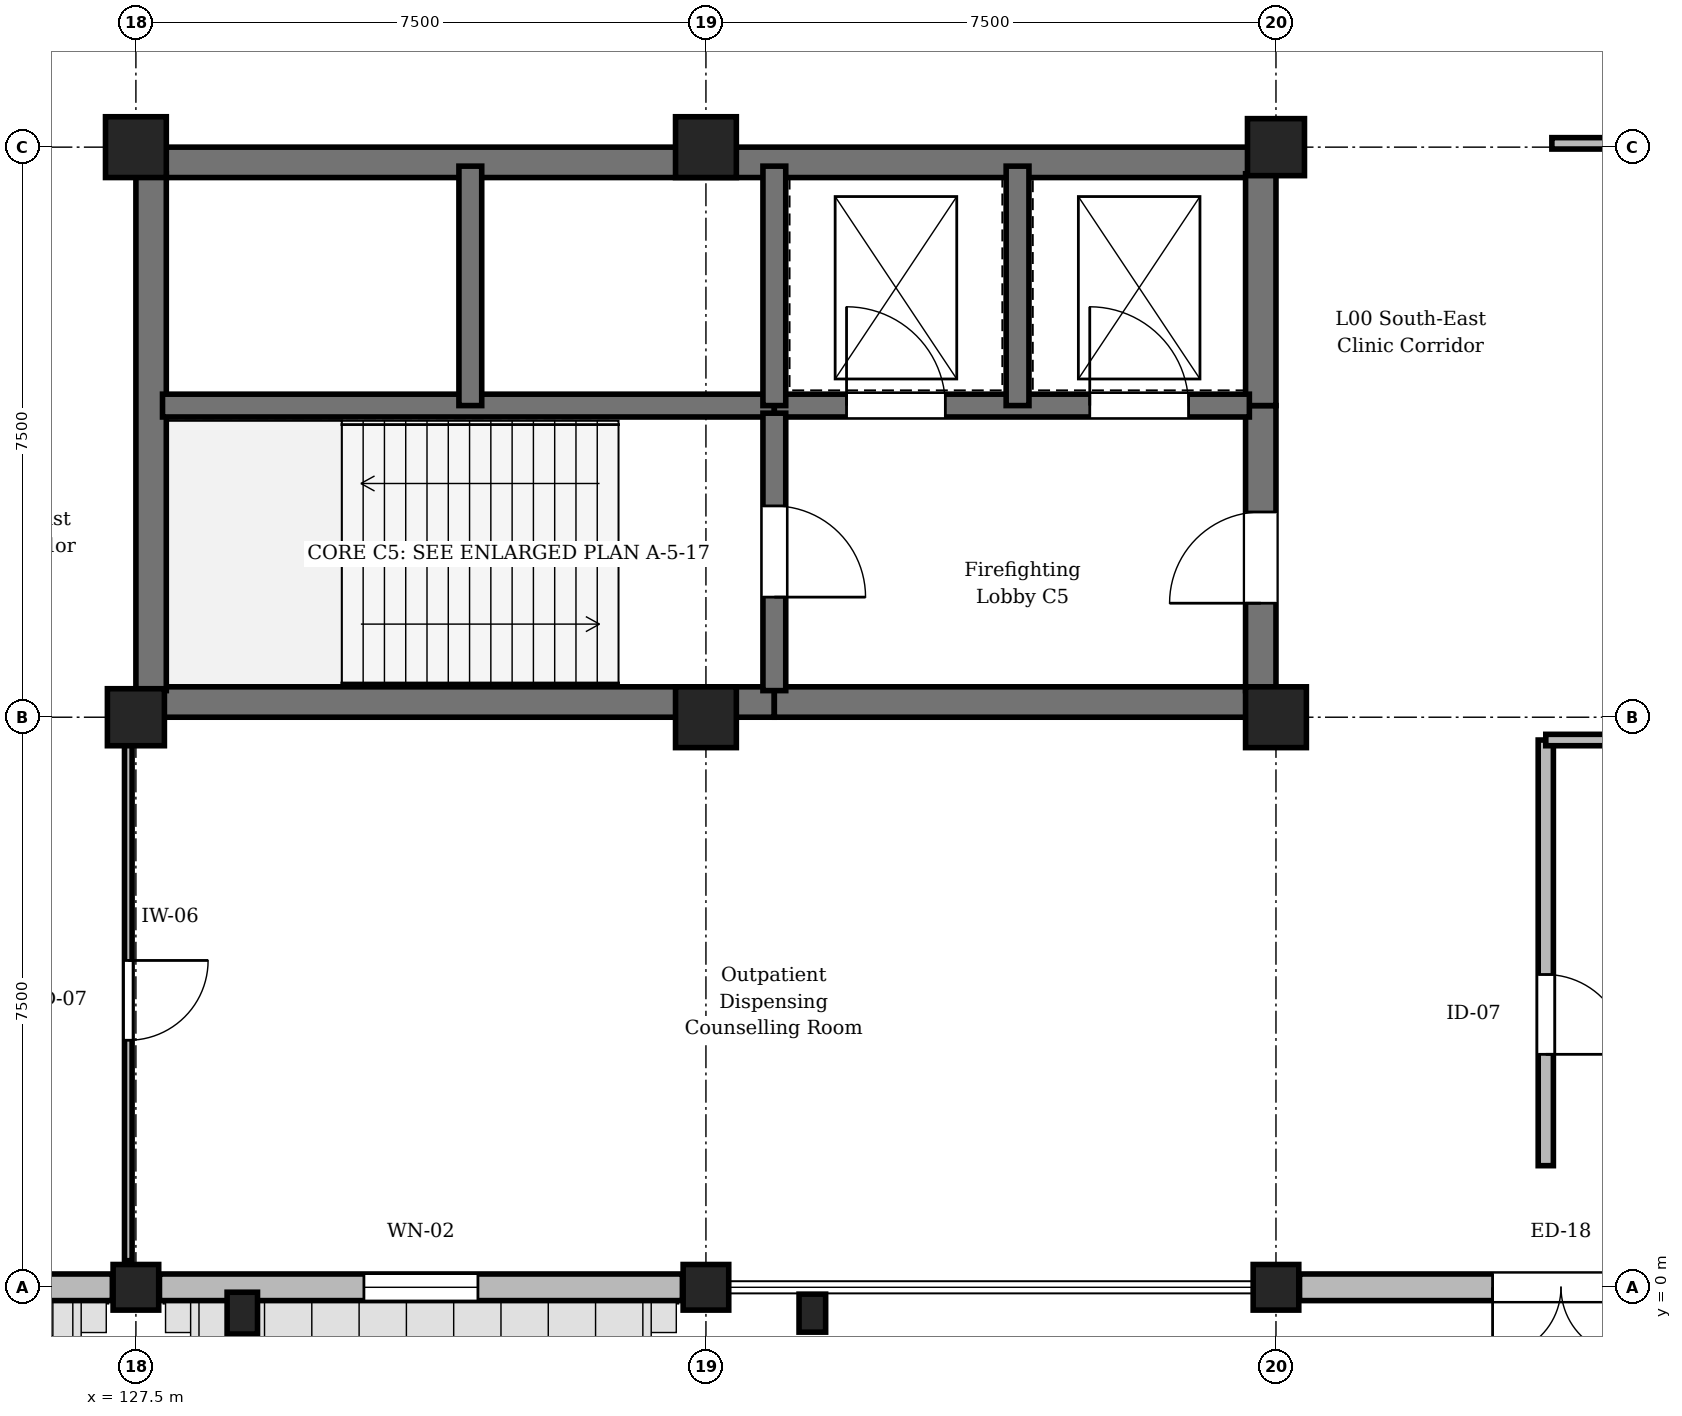
"""IFC4 building model, lengths in metres.
Left out: names, types, materials, properties, quantities, classifications, styles, units other than length and angle.
Written with IfcOpenShell. Run it as: python <this file> out.ifc"""

import sys

from ifc_helpers import new_model, si_unit, direction, frame, frame_2d, origin, origin_2d, place, context, subcontext, project, spatial, rectangle, circle, extrude, element, fill, save


model = new_model("IFC4")
c1 = context("Model", 3, precision=1e-05, world=origin(), true_north=direction((0.0, 1.0)))
c2 = subcontext(c1, "Body", "Model", "MODEL_VIEW")
j1 = project(units=[si_unit("LENGTHUNIT", "METRE"), si_unit("PLANEANGLEUNIT", "RADIAN")], contexts=[c1])
p1 = place(None, origin())
s1 = spatial("IfcSite", under=j1, at=p1, CompositionType="ELEMENT")
p2 = place(p1, origin())
s2 = spatial("IfcBuilding", under=s1, at=p2, CompositionType="ELEMENT")
p3 = place(p2, origin())
s3 = spatial("IfcBuildingStorey", under=s2, at=p3, CompositionType="ELEMENT", Elevation=0.0)
p4 = place(p3, frame((127.5, 0.0, 0.0), z_axis=(0.0, 0.0, 1.0), x_axis=(1.0, 0.0, 0.0)))
e1 = element("IfcColumn", 1, at=p4, inside=s3, PredefinedType="COLUMN", context=c2, shape_type="SweptSolid", body=[
    extrude(rectangle(XDim=0.6, YDim=0.6, at=origin_2d()), origin(), (0.0, 0.0, 1.0), 4.8),
])
p5 = place(p3, frame((127.5, 7.5, 0.0), z_axis=(0.0, 0.0, 1.0), x_axis=(1.0, 0.0, 0.0)))
e2 = element("IfcColumn", 2, at=p5, inside=s3, PredefinedType="COLUMN", context=c2, shape_type="SweptSolid", body=[
    extrude(circle(Radius=0.375, at=origin_2d()), origin(), (0.0, 0.0, 1.0), 4.8),
])
p6 = place(p3, frame((127.5, 15.0, 0.0), z_axis=(0.0, 0.0, 1.0), x_axis=(1.0, 0.0, 0.0)))
e3 = element("IfcColumn", 3, at=p6, inside=s3, PredefinedType="COLUMN", context=c2, shape_type="SweptSolid", body=[
    extrude(rectangle(XDim=0.8, YDim=0.8, at=origin_2d()), origin(), (0.0, 0.0, 1.0), 4.8),
])
p7 = place(p3, frame((135.0, 0.0, 0.0), z_axis=(0.0, 0.0, 1.0), x_axis=(1.0, 0.0, 0.0)))
e4 = element("IfcColumn", 4, at=p7, inside=s3, PredefinedType="COLUMN", context=c2, shape_type="SweptSolid", body=[
    extrude(circle(Radius=0.3, at=origin_2d()), origin(), (0.0, 0.0, 1.0), 4.8),
])
for number, where, z_axis, x_axis in (
    (5, (135.0, 7.5, 0.0), (0.0, 0.0, 1.0), (1.0, 0.0, 0.0)),
    (6, (135.0, 15.0, 0.0), (0.0, 0.0, 1.0), (1.0, 0.0, 0.0)),
):
    element("IfcColumn", number, at=place(p3, frame(where, z_axis=z_axis, x_axis=x_axis)), inside=s3, PredefinedType="COLUMN", context=c2, shape_type="SweptSolid", body=[
        extrude(rectangle(XDim=0.8, YDim=0.8, at=origin_2d()), origin(), (0.0, 0.0, 1.0), 4.8),
    ])
p8 = place(p3, frame((142.5, 0.0, 0.0), z_axis=(0.0, 0.0, 1.0), x_axis=(1.0, 0.0, 0.0)))
e7 = element("IfcColumn", 7, at=p8, inside=s3, PredefinedType="COLUMN", context=c2, shape_type="SweptSolid", body=[
    extrude(rectangle(XDim=0.6, YDim=0.6, at=origin_2d()), origin(), (0.0, 0.0, 1.0), 4.8),
])
p9 = place(p3, frame((142.5, 7.5, 0.0), z_axis=(0.0, 0.0, 1.0), x_axis=(1.0, 0.0, 0.0)))
e8 = element("IfcColumn", 8, at=p9, inside=s3, PredefinedType="COLUMN", context=c2, shape_type="SweptSolid", body=[
    extrude(rectangle(XDim=0.8, YDim=0.8, at=origin_2d()), origin(), (0.0, 0.0, 1.0), 4.8),
])
p10 = place(p3, frame((142.5, 15.0, 0.0), z_axis=(0.0, 0.0, 1.0), x_axis=(1.0, 0.0, 0.0)))
e9 = element("IfcColumn", 9, at=p10, inside=s3, PredefinedType="COLUMN", context=c2, shape_type="SweptSolid", body=[
    extrude(circle(Radius=0.375, at=origin_2d()), origin(), (0.0, 0.0, 1.0), 4.8),
])
p11 = place(p3, frame((128.9, -0.34, 0.0), z_axis=(0.0, 0.0, 1.0), x_axis=(1.0, 0.0, 0.0)))
e10 = element("IfcColumn", 10, at=p11, inside=s3, PredefinedType="PILASTER", context=c2, shape_type="SweptSolid", body=[
    extrude(rectangle(XDim=0.4, YDim=0.55, at=origin_2d()), origin(), (0.0, 0.0, 1.0), 4.1),
])
p12 = place(p3, frame((136.4, -0.34, 0.0), z_axis=(0.0, 0.0, 1.0), x_axis=(1.0, 0.0, 0.0)))
e11 = element("IfcColumn", 11, at=p12, inside=s3, PredefinedType="PILASTER", context=c2, shape_type="SweptSolid", body=[
    extrude(rectangle(XDim=0.35, YDim=0.5, at=origin_2d()), origin(), (0.0, 0.0, 1.0), 4.1),
])
p13 = place(p3, frame((127.19, 0.0, 0.0), z_axis=(0.0, 0.0, 1.0), x_axis=(-1.0, 0.0, 0.0)))
e12 = element("IfcWall", 12, at=p13, inside=s3, PredefinedType="STANDARD", context=c2, shape_type="SweptSolid", body=[
    extrude(rectangle(XDim=6.88, YDim=0.35, at=frame_2d((3.44, 0.0))), origin(), (0.0, 0.0, 1.0), 3.95),
])
p14 = place(p13, frame((2.54, 0.0, 0.9)))
e13 = element("IfcOpeningElement", 13, at=p14, cuts=e12, PredefinedType="OPENING", context=c2, shape_type="SweptSolid", body=[
    extrude(rectangle(XDim=1.8, YDim=2.4, at=frame_2d((0.9, 1.2))), frame((0.0, 0.185, 0.0), z_axis=(0.0, -1.0, 0.0), x_axis=(1.0, 0.0, 0.0)), (0.0, 0.0, 1.0), 0.37),
])
p15 = place(p3, frame((134.69, 0.0, 0.0), z_axis=(0.0, 0.0, 1.0), x_axis=(-1.0, 0.0, 0.0)))
e14 = element("IfcWall", 14, at=p15, inside=s3, PredefinedType="STANDARD", context=c2, shape_type="SweptSolid", body=[
    extrude(rectangle(XDim=6.88, YDim=0.35, at=frame_2d((3.44, 0.0))), origin(), (0.0, 0.0, 1.0), 3.95),
])
p16 = place(p15, frame((2.69, 0.0, 0.9)))
e15 = element("IfcOpeningElement", 15, at=p16, cuts=e14, PredefinedType="OPENING", context=c2, shape_type="SweptSolid", body=[
    extrude(rectangle(XDim=1.5, YDim=2.4, at=frame_2d((0.75, 1.2))), frame((0.0, 0.185, 0.0), z_axis=(0.0, -1.0, 0.0), x_axis=(1.0, 0.0, 0.0)), (0.0, 0.0, 1.0), 0.37),
])
p17 = place(p3, frame((149.69, 0.0, 0.0), z_axis=(0.0, 0.0, 1.0), x_axis=(-1.0, 0.0, 0.0)))
e16 = element("IfcWall", 16, at=p17, inside=s3, PredefinedType="STANDARD", context=c2, shape_type="SweptSolid", body=[
    extrude(rectangle(XDim=6.88, YDim=0.35, at=frame_2d((3.44, 0.0))), origin(), (0.0, 0.0, 1.0), 3.95),
])
p18 = place(p17, frame((2.54, 0.0, 0.0)))
e17 = element("IfcOpeningElement", 17, at=p18, cuts=e16, PredefinedType="OPENING", context=c2, shape_type="SweptSolid", body=[
    extrude(rectangle(XDim=1.8, YDim=2.5, at=frame_2d((0.9, 1.25))), frame((0.0, 0.185, 0.0), z_axis=(0.0, -1.0, 0.0), x_axis=(1.0, 0.0, 0.0)), (0.0, 0.0, 1.0), 0.37),
])
p19 = place(p3, frame((127.85, 7.7, 0.0), z_axis=(0.0, 0.0, 1.0), x_axis=(1.0, 0.0, 0.0)))
e18 = element("IfcWall", 18, at=p19, inside=s3, PredefinedType="SHEAR", context=c2, shape_type="SweptSolid", body=[
    extrude(rectangle(XDim=8.05, YDim=0.4, at=frame_2d((4.025, 0.0))), origin(), (0.0, 0.0, 1.0), 4.5),
])
p20 = place(p3, frame((135.9, 7.7, 0.0), z_axis=(0.0, 0.0, 1.0), x_axis=(1.0, 0.0, 0.0)))
e19 = element("IfcWall", 19, at=p20, inside=s3, PredefinedType="SHEAR", context=c2, shape_type="SweptSolid", body=[
    extrude(rectangle(XDim=6.25, YDim=0.4, at=frame_2d((3.125, 0.0))), origin(), (0.0, 0.0, 1.0), 4.5),
])
p21 = place(p3, frame((127.85, 14.8, 0.0), z_axis=(0.0, 0.0, 1.0), x_axis=(1.0, 0.0, 0.0)))
e20 = element("IfcWall", 20, at=p21, inside=s3, PredefinedType="SHEAR", context=c2, shape_type="SweptSolid", body=[
    extrude(rectangle(XDim=14.3, YDim=0.4, at=frame_2d((7.15, 0.0))), origin(), (0.0, 0.0, 1.0), 4.5),
])
p22 = place(p3, frame((127.7, 7.85, 0.0), z_axis=(0.0, 0.0, 1.0), x_axis=(0.0, 1.0, 0.0)))
e21 = element("IfcWall", 21, at=p22, inside=s3, PredefinedType="SHEAR", context=c2, shape_type="SweptSolid", body=[
    extrude(rectangle(XDim=6.8, YDim=0.4, at=frame_2d((3.4, 0.0))), origin(), (0.0, 0.0, 1.0), 4.5),
])
p23 = place(p3, frame((142.3, 7.85, 0.0), z_axis=(0.0, 0.0, 1.0), x_axis=(0.0, 1.0, 0.0)))
e22 = element("IfcWall", 22, at=p23, inside=s3, PredefinedType="SHEAR", context=c2, shape_type="SweptSolid", body=[
    extrude(rectangle(XDim=3.75, YDim=0.4, at=frame_2d((1.875, 0.0))), origin(), (0.0, 0.0, 1.0), 4.5),
])
p24 = place(p23, frame((1.15, 0.0, 0.0)))
e23 = element("IfcOpeningElement", 23, at=p24, cuts=e22, PredefinedType="OPENING", context=c2, shape_type="SweptSolid", body=[
    extrude(rectangle(XDim=1.2, YDim=2.25, at=frame_2d((0.6, 1.125))), frame((0.0, 0.21, 0.0), z_axis=(0.0, -1.0, 0.0), x_axis=(1.0, 0.0, 0.0)), (0.0, 0.0, 1.0), 0.42),
])
p25 = place(p3, frame((142.3, 11.6, 0.0), z_axis=(0.0, 0.0, 1.0), x_axis=(0.0, 1.0, 0.0)))
e24 = element("IfcWall", 24, at=p25, inside=s3, PredefinedType="SHEAR", context=c2, shape_type="SweptSolid", body=[
    extrude(rectangle(XDim=3.05, YDim=0.4, at=frame_2d((1.525, 0.0))), origin(), (0.0, 0.0, 1.0), 4.5),
])
p26 = place(p3, frame((127.85, 11.6, 0.0), z_axis=(0.0, 0.0, 1.0), x_axis=(1.0, 0.0, 0.0)))
e25 = element("IfcWall", 25, at=p26, inside=s3, PredefinedType="SHEAR", context=c2, shape_type="SweptSolid", body=[
    extrude(rectangle(XDim=8.05, YDim=0.3, at=frame_2d((4.025, 0.0))), origin(), (0.0, 0.0, 1.0), 4.5),
])
p27 = place(p3, frame((135.9, 11.6, 0.0), z_axis=(0.0, 0.0, 1.0), x_axis=(1.0, 0.0, 0.0)))
e26 = element("IfcWall", 26, at=p27, inside=s3, PredefinedType="SHEAR", context=c2, shape_type="SweptSolid", body=[
    extrude(rectangle(XDim=6.25, YDim=0.3, at=frame_2d((3.125, 0.0))), origin(), (0.0, 0.0, 1.0), 4.5),
])
p28 = place(p27, frame((0.95, 0.0, 0.0)))
e27 = element("IfcOpeningElement", 27, at=p28, cuts=e26, PredefinedType="OPENING", context=c2, shape_type="SweptSolid", body=[
    extrude(rectangle(XDim=1.3, YDim=2.2, at=frame_2d((0.65, 1.1))), frame((0.0, 0.16, 0.0), z_axis=(0.0, -1.0, 0.0), x_axis=(1.0, 0.0, 0.0)), (0.0, 0.0, 1.0), 0.32),
])
p29 = place(p27, frame((4.15, 0.0, 0.0)))
e28 = element("IfcOpeningElement", 28, at=p29, cuts=e26, PredefinedType="OPENING", context=c2, shape_type="SweptSolid", body=[
    extrude(rectangle(XDim=1.3, YDim=2.2, at=frame_2d((0.65, 1.1))), frame((0.0, 0.16, 0.0), z_axis=(0.0, -1.0, 0.0), x_axis=(1.0, 0.0, 0.0)), (0.0, 0.0, 1.0), 0.32),
])
p30 = place(p3, frame((135.9, 11.5, 0.0), z_axis=(0.0, 0.0, 1.0), x_axis=(0.0, -1.0, 0.0)))
e29 = element("IfcWall", 29, at=p30, inside=s3, PredefinedType="SHEAR", context=c2, shape_type="SweptSolid", body=[
    extrude(rectangle(XDim=3.65, YDim=0.3, at=frame_2d((1.825, 0.0))), origin(), (0.0, 0.0, 1.0), 4.5),
])
p31 = place(p30, frame((1.22, 0.0, 0.0)))
e30 = element("IfcOpeningElement", 30, at=p31, cuts=e29, PredefinedType="OPENING", context=c2, shape_type="SweptSolid", body=[
    extrude(rectangle(XDim=1.2, YDim=2.25, at=frame_2d((0.6, 1.125))), frame((0.0, 0.16, 0.0), z_axis=(0.0, -1.0, 0.0), x_axis=(1.0, 0.0, 0.0)), (0.0, 0.0, 1.0), 0.32),
])
for number, where, z_axis, x_axis in (
    (31, (131.9, 11.6, 0.0), (0.0, 0.0, 1.0), (0.0, 1.0, 0.0)),
    (32, (135.9, 11.6, 0.0), (0.0, 0.0, 1.0), (0.0, 1.0, 0.0)),
    (33, (139.1, 11.6, 0.0), (0.0, 0.0, 1.0), (0.0, 1.0, 0.0)),
):
    element("IfcWall", number, at=place(p3, frame(where, z_axis=z_axis, x_axis=x_axis)), inside=s3, PredefinedType="SHEAR", context=c2, shape_type="SweptSolid", body=[
        extrude(rectangle(XDim=3.15, YDim=0.3, at=frame_2d((1.575, 0.0))), origin(), (0.0, 0.0, 1.0), 4.5),
    ])
p32 = place(p3, frame((127.4, 7.2, 0.0), z_axis=(0.0, 0.0, 1.0), x_axis=(0.0, -1.0, 0.0)))
e34 = element("IfcWall", 34, at=p32, inside=s3, PredefinedType="PARTITIONING", context=c2, shape_type="SweptSolid", body=[
    extrude(rectangle(XDim=6.85, YDim=0.1, at=frame_2d((3.425, 0.0))), origin(), (0.0, 0.0, 1.0), 3.985),
])
p33 = place(p32, frame((2.9, 0.0, 0.0)))
e35 = element("IfcOpeningElement", 35, at=p33, cuts=e34, PredefinedType="OPENING", context=c2, shape_type="SweptSolid", body=[
    extrude(rectangle(XDim=1.05, YDim=2.2, at=frame_2d((0.525, 1.1))), frame((0.0, 0.06, 0.0), z_axis=(0.0, -1.0, 0.0), x_axis=(1.0, 0.0, 0.0)), (0.0, 0.0, 1.0), 0.12),
])
p34 = place(p3, frame((146.05, 7.2, 0.0), z_axis=(0.0, 0.0, 1.0), x_axis=(0.0, -1.0, 0.0)))
e36 = element("IfcWall", 36, at=p34, inside=s3, PredefinedType="STANDARD", context=c2, shape_type="SweptSolid", body=[
    extrude(rectangle(XDim=5.6, YDim=0.2, at=frame_2d((2.8, 0.0))), origin(), (0.0, 0.0, 1.0), 4.485),
])
p35 = place(p34, frame((3.085, 0.0, 0.0)))
e37 = element("IfcOpeningElement", 37, at=p35, cuts=e36, PredefinedType="OPENING", context=c2, shape_type="SweptSolid", body=[
    extrude(rectangle(XDim=1.05, YDim=2.2, at=frame_2d((0.525, 1.1))), frame((0.0, 0.11, 0.0), z_axis=(0.0, -1.0, 0.0), x_axis=(1.0, 0.0, 0.0)), (0.0, 0.0, 1.0), 0.22),
])
p36 = place(p3, frame((154.67, 15.05, 0.0), z_axis=(0.0, 0.0, 1.0), x_axis=(-1.0, 0.0, 0.0)))
e38 = element("IfcWall", 38, at=p36, inside=s3, PredefinedType="PARTITIONING", context=c2, shape_type="SweptSolid", body=[
    extrude(rectangle(XDim=8.54, YDim=0.15, at=frame_2d((4.27, 0.0))), origin(), (0.0, 0.0, 1.0), 3.835),
])
p37 = place(p36, frame((0.25, 0.0, 0.0)))
e39 = element("IfcOpeningElement", 39, at=p37, cuts=e38, PredefinedType="OPENING", context=c2, shape_type="SweptSolid", body=[
    extrude(rectangle(XDim=1.35, YDim=2.25, at=frame_2d((0.675, 1.125))), frame((0.0, 0.085, 0.0), z_axis=(0.0, -1.0, 0.0), x_axis=(1.0, 0.0, 0.0)), (0.0, 0.0, 1.0), 0.17),
])
p38 = place(p3, frame((146.05, 7.2, 0.0), z_axis=(0.0, 0.0, 1.0), x_axis=(1.0, 0.0, 0.0)))
e40 = element("IfcWall", 40, at=p38, inside=s3, PredefinedType="PARTITIONING", context=c2, shape_type="SweptSolid", body=[
    extrude(rectangle(XDim=26.1, YDim=0.15, at=frame_2d((13.05, 0.0))), origin(), (0.0, 0.0, 1.0), 3.835),
])
p39 = place(p16, origin())
e41 = element("IfcWindow", 41, at=p39, inside=s3, PartitioningType="SINGLE_PANEL", PredefinedType="WINDOW", context=c2, shape_type="SweptSolid", body=[
    extrude(rectangle(XDim=1.5, YDim=2.4, at=frame_2d((0.75, 1.2))), frame((0.0, 0.03, 0.0), z_axis=(0.0, -1.0, 0.0), x_axis=(1.0, 0.0, 0.0)), (0.0, 0.0, 1.0), 0.06),
])
fill(e15, e41)
p40 = place(p18, origin())
e42 = element("IfcDoor", 42, at=p40, inside=s3, OperationType="DOUBLE_DOOR_SINGLE_SWING", PredefinedType="DOOR", context=c2, shape_type="SweptSolid", body=[
    extrude(rectangle(XDim=1.8, YDim=2.5, at=frame_2d((0.9, 1.25))), frame((0.0, 0.025, 0.0), z_axis=(0.0, -1.0, 0.0), x_axis=(1.0, 0.0, 0.0)), (0.0, 0.0, 1.0), 0.05),
])
fill(e17, e42)
p41 = place(p24, origin())
e43 = element("IfcDoor", 43, at=p41, inside=s3, OperationType="SINGLE_SWING_LEFT", PredefinedType="DOOR", context=c2, shape_type="SweptSolid", body=[
    extrude(rectangle(XDim=1.2, YDim=2.25, at=frame_2d((0.6, 1.125))), frame((0.0, 0.025, 0.0), z_axis=(0.0, -1.0, 0.0), x_axis=(1.0, 0.0, 0.0)), (0.0, 0.0, 1.0), 0.05),
])
fill(e23, e43)
p42 = place(p28, origin())
e44 = element("IfcDoor", 44, at=p42, inside=s3, OperationType="DOUBLE_DOOR_SLIDING", PredefinedType="DOOR", context=c2, shape_type="SweptSolid", body=[
    extrude(rectangle(XDim=1.3, YDim=2.2, at=frame_2d((0.65, 1.1))), frame((0.0, 0.025, 0.0), z_axis=(0.0, -1.0, 0.0), x_axis=(1.0, 0.0, 0.0)), (0.0, 0.0, 1.0), 0.05),
])
fill(e27, e44)
p43 = place(p29, origin())
e45 = element("IfcDoor", 45, at=p43, inside=s3, OperationType="DOUBLE_DOOR_SLIDING", PredefinedType="DOOR", context=c2, shape_type="SweptSolid", body=[
    extrude(rectangle(XDim=1.3, YDim=2.2, at=frame_2d((0.65, 1.1))), frame((0.0, 0.025, 0.0), z_axis=(0.0, -1.0, 0.0), x_axis=(1.0, 0.0, 0.0)), (0.0, 0.0, 1.0), 0.05),
])
fill(e28, e45)
p44 = place(p31, origin())
e46 = element("IfcDoor", 46, at=p44, inside=s3, OperationType="SINGLE_SWING_RIGHT", PredefinedType="DOOR", context=c2, shape_type="SweptSolid", body=[
    extrude(rectangle(XDim=1.2, YDim=2.25, at=frame_2d((0.6, 1.125))), frame((0.0, 0.025, 0.0), z_axis=(0.0, -1.0, 0.0), x_axis=(1.0, 0.0, 0.0)), (0.0, 0.0, 1.0), 0.05),
])
fill(e30, e46)
p45 = place(p33, origin())
e47 = element("IfcDoor", 47, at=p45, inside=s3, OperationType="SINGLE_SWING_LEFT", PredefinedType="DOOR", context=c2, shape_type="SweptSolid", body=[
    extrude(rectangle(XDim=1.05, YDim=2.2, at=frame_2d((0.525, 1.1))), frame((0.0, 0.025, 0.0), z_axis=(0.0, -1.0, 0.0), x_axis=(1.0, 0.0, 0.0)), (0.0, 0.0, 1.0), 0.05),
])
fill(e35, e47)
p46 = place(p35, origin())
e48 = element("IfcDoor", 48, at=p46, inside=s3, OperationType="SINGLE_SWING_RIGHT", PredefinedType="DOOR", context=c2, shape_type="SweptSolid", body=[
    extrude(rectangle(XDim=1.05, YDim=2.2, at=frame_2d((0.525, 1.1))), frame((0.0, 0.025, 0.0), z_axis=(0.0, -1.0, 0.0), x_axis=(1.0, 0.0, 0.0)), (0.0, 0.0, 1.0), 0.05),
])
fill(e37, e48)
save(model, sys.argv[1])
